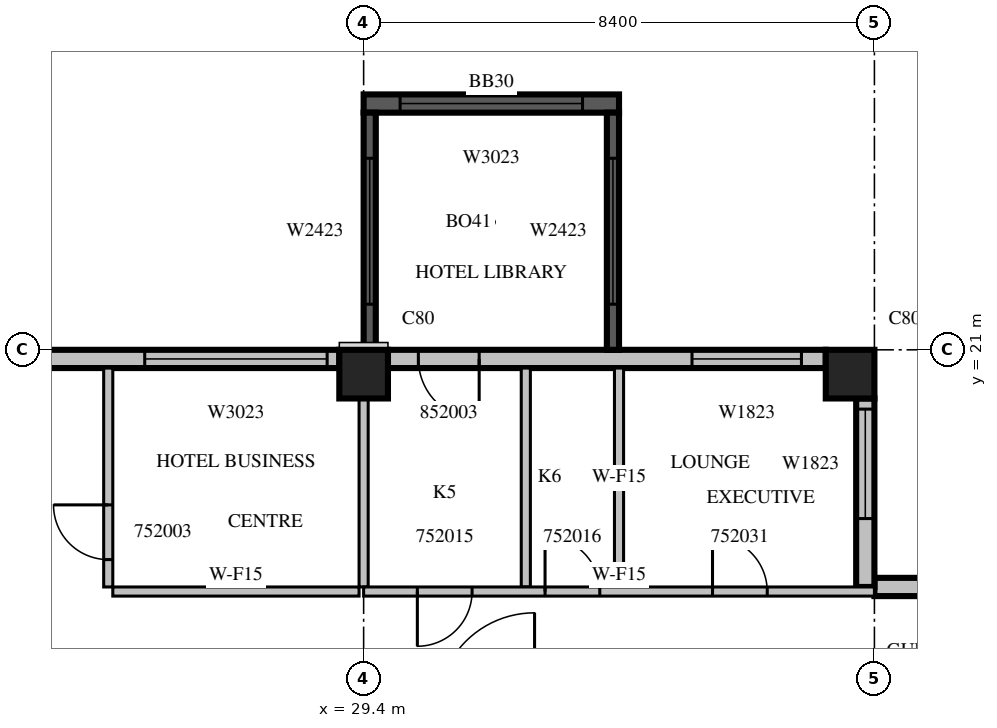
"""IFC4 building model, lengths in metres.
Left out: names, types, materials, properties, quantities, classifications, styles, units other than length and angle.
Written with IfcOpenShell. Run it as: python <this file> out.ifc"""

import sys

from ifc_helpers import new_model, si_unit, direction, frame, frame_2d, origin, origin_2d, place, context, subcontext, project, spatial, rectangle, extrude, source, transform, mapped, element, fill, save


model = new_model("IFC4")
c1 = context("Model", 3, precision=1e-05, world=origin(), true_north=direction((0.0, 1.0)))
c2 = subcontext(c1, "Body", "Model", "MODEL_VIEW")
j1 = project(units=[si_unit("LENGTHUNIT", "METRE"), si_unit("PLANEANGLEUNIT", "RADIAN")], contexts=[c1])
p1 = place(None, origin())
s1 = spatial("IfcSite", under=j1, at=p1, CompositionType="ELEMENT")
p2 = place(p1, origin())
s2 = spatial("IfcBuilding", under=s1, at=p2, CompositionType="ELEMENT")
p3 = place(p2, frame((0.0, 0.0, 231.0)))
s3 = spatial("IfcBuildingStorey", under=s2, at=p3, CompositionType="ELEMENT", Elevation=231.0)
m1 = source(origin(), c2, "Body", "SweptSolid", [
    extrude(rectangle(XDim=0.8, YDim=0.8, at=origin_2d()), origin(), (0.0, 0.0, 1.0), 3.8),
])
for number, where, z_axis, x_axis in (
    (1, (29.4, 20.6, 0.0), (0.0, 0.0, 1.0), (1.0, 0.0, 0.0)),
    (2, (37.4, 20.6, 0.0), (0.0, 0.0, 1.0), (1.0, 0.0, 0.0)),
):
    element("IfcColumn", number, at=place(p3, frame(where, z_axis=z_axis, x_axis=x_axis)), inside=s3, PredefinedType="COLUMN", context=c2, shape_type="MappedRepresentation", body=[
        mapped(m1, transform((0.0, 0.0, 0.0), scale=1.0)),
    ])
m2 = source(origin(), c2, "Body", "SweptSolid", [
    extrude(rectangle(XDim=15.96, YDim=0.3, at=frame_2d((7.98, 0.0))), origin(), (0.0, 0.0, 1.0), 3.4),
])
p4 = place(p3, frame((53.76, 17.1, 0.0), z_axis=(0.0, 0.0, 1.0), x_axis=(-1.0, 0.0, 0.0)))
e3 = element("IfcWall", 3, at=p4, inside=s3, PredefinedType="STANDARD", context=c2, shape_type="MappedRepresentation", body=[
    mapped(m2, transform((0.0, 0.0, 0.0), scale=1.0)),
])
m3 = source(origin(), c2, "Body", "SweptSolid", [
    extrude(rectangle(XDim=3.0, YDim=2.3, at=frame_2d((1.5, 1.15))), frame((0.0, 0.16, 0.0), z_axis=(0.0, -1.0, 0.0), x_axis=(1.0, 0.0, 0.0)), (0.0, 0.0, 1.0), 0.32),
])
p5 = place(p4, frame((0.6, 0.0, 0.6)))
e4 = element("IfcOpeningElement", 4, at=p5, cuts=e3, PredefinedType="OPENING", context=c2, shape_type="MappedRepresentation", body=[
    mapped(m3, transform((0.0, 0.0, 0.0), scale=1.0)),
])
p6 = place(p4, frame((4.8, 0.0, 0.6)))
e5 = element("IfcOpeningElement", 5, at=p6, cuts=e3, PredefinedType="OPENING", context=c2, shape_type="MappedRepresentation", body=[
    mapped(m3, transform((0.0, 0.0, 0.0), scale=1.0)),
])
m4 = source(origin(), c2, "Body", "SweptSolid", [
    extrude(rectangle(XDim=3.6, YDim=2.3, at=frame_2d((1.8, 1.15))), frame((0.0, 0.16, 0.0), z_axis=(0.0, -1.0, 0.0), x_axis=(1.0, 0.0, 0.0)), (0.0, 0.0, 1.0), 0.32),
])
p7 = place(p4, frame((9.54, 0.0, 0.6)))
e6 = element("IfcOpeningElement", 6, at=p7, cuts=e3, PredefinedType="OPENING", context=c2, shape_type="MappedRepresentation", body=[
    mapped(m4, transform((0.0, 0.0, 0.0), scale=1.0)),
])
m5 = source(origin(), c2, "Body", "SweptSolid", [
    extrude(rectangle(XDim=3.1, YDim=0.3, at=frame_2d((1.55, 0.0))), origin(), (0.0, 0.0, 1.0), 3.4),
])
p8 = place(p3, frame((37.65, 17.1, 0.0), z_axis=(0.0, 0.0, 1.0), x_axis=(0.0, 1.0, 0.0)))
e7 = element("IfcWall", 7, at=p8, inside=s3, PredefinedType="STANDARD", context=c2, shape_type="MappedRepresentation", body=[
    mapped(m5, transform((0.0, 0.0, 0.0), scale=1.0)),
])
m6 = source(origin(), c2, "Body", "SweptSolid", [
    extrude(rectangle(XDim=1.8, YDim=2.3, at=frame_2d((0.9, 1.15))), frame((0.0, 0.16, 0.0), z_axis=(0.0, -1.0, 0.0), x_axis=(1.0, 0.0, 0.0)), (0.0, 0.0, 1.0), 0.32),
])
p9 = place(p8, frame((1.125, 0.0, 0.6)))
e8 = element("IfcOpeningElement", 8, at=p9, cuts=e7, PredefinedType="OPENING", context=c2, shape_type="MappedRepresentation", body=[
    mapped(m6, transform((0.0, 0.0, 0.0), scale=1.0)),
])
m7 = source(origin(), c2, "Body", "SweptSolid", [
    extrude(rectangle(XDim=7.2, YDim=0.3, at=frame_2d((3.6, 0.0))), origin(), (0.0, 0.0, 1.0), 3.4),
])
p10 = place(p3, frame((37.0, 20.85, 0.0), z_axis=(0.0, 0.0, 1.0), x_axis=(-1.0, 0.0, 0.0)))
e9 = element("IfcWall", 9, at=p10, inside=s3, PredefinedType="STANDARD", context=c2, shape_type="MappedRepresentation", body=[
    mapped(m7, transform((0.0, 0.0, 0.0), scale=1.0)),
])
p11 = place(p10, frame((0.4, 0.0, 0.6)))
e10 = element("IfcOpeningElement", 10, at=p11, cuts=e9, PredefinedType="OPENING", context=c2, shape_type="MappedRepresentation", body=[
    mapped(m6, transform((0.0, 0.0, 0.0), scale=1.0)),
])
m8 = source(origin(), c2, "Body", "SweptSolid", [
    extrude(rectangle(XDim=1.0, YDim=2.1, at=frame_2d((0.5, 1.05))), frame((0.0, 0.16, 0.0), z_axis=(0.0, -1.0, 0.0), x_axis=(1.0, 0.0, 0.0)), (0.0, 0.0, 1.0), 0.32),
])
p12 = place(p10, frame((5.7, 0.0, 0.0)))
e11 = element("IfcOpeningElement", 11, at=p12, cuts=e9, PredefinedType="OPENING", context=c2, shape_type="MappedRepresentation", body=[
    mapped(m8, transform((0.0, 0.0, 0.0), scale=1.0)),
])
p13 = place(p3, frame((29.0, 20.85, 0.0), z_axis=(0.0, 0.0, 1.0), x_axis=(-1.0, 0.0, 0.0)))
e12 = element("IfcWall", 12, at=p13, inside=s3, PredefinedType="STANDARD", context=c2, shape_type="MappedRepresentation", body=[
    mapped(m7, transform((0.0, 0.0, 0.0), scale=1.0)),
])
p14 = place(p13, frame((0.2, 0.0, 0.6)))
e13 = element("IfcOpeningElement", 13, at=p14, cuts=e12, PredefinedType="OPENING", context=c2, shape_type="MappedRepresentation", body=[
    mapped(m3, transform((0.0, 0.0, 0.0), scale=1.0)),
])
p15 = place(p13, frame((5.0, 0.0, 0.6)))
e14 = element("IfcOpeningElement", 14, at=p15, cuts=e12, PredefinedType="OPENING", context=c2, shape_type="MappedRepresentation", body=[
    mapped(m6, transform((0.0, 0.0, 0.0), scale=1.0)),
])
m9 = source(origin(), c2, "Body", "SweptSolid", [
    extrude(rectangle(XDim=4.2, YDim=0.3, at=frame_2d((2.1, 0.0))), origin(), (0.0, 0.0, 1.0), 3.39),
])
p16 = place(p3, frame((33.6, 25.05, 0.0), z_axis=(0.0, 0.0, 1.0), x_axis=(-1.0, 0.0, 0.0)))
e15 = element("IfcWall", 15, at=p16, inside=s3, PredefinedType="SOLIDWALL", context=c2, shape_type="MappedRepresentation", body=[
    mapped(m9, transform((0.0, 0.0, 0.0), scale=1.0)),
])
p17 = place(p16, frame((0.6, 0.0, 0.6)))
e16 = element("IfcOpeningElement", 16, at=p17, cuts=e15, PredefinedType="OPENING", context=c2, shape_type="MappedRepresentation", body=[
    mapped(m3, transform((0.0, 0.0, 0.0), scale=1.0)),
])
m10 = source(origin(), c2, "Body", "SweptSolid", [
    extrude(rectangle(XDim=3.9, YDim=0.2, at=frame_2d((1.95, 0.0))), origin(), (0.0, 0.0, 1.0), 3.39),
])
p18 = place(p3, frame((33.5, 21.0, 0.0), z_axis=(0.0, 0.0, 1.0), x_axis=(0.0, 1.0, 0.0)))
e17 = element("IfcWall", 17, at=p18, inside=s3, PredefinedType="SOLIDWALL", context=c2, shape_type="MappedRepresentation", body=[
    mapped(m10, transform((0.0, 0.0, 0.0), scale=1.0)),
])
m11 = source(origin(), c2, "Body", "SweptSolid", [
    extrude(rectangle(XDim=2.4, YDim=2.3, at=frame_2d((1.2, 1.15))), frame((0.0, 0.11, 0.0), z_axis=(0.0, -1.0, 0.0), x_axis=(1.0, 0.0, 0.0)), (0.0, 0.0, 1.0), 0.22),
])
p19 = place(p18, frame((0.75, 0.0, 0.6)))
e18 = element("IfcOpeningElement", 18, at=p19, cuts=e17, PredefinedType="OPENING", context=c2, shape_type="MappedRepresentation", body=[
    mapped(m11, transform((0.0, 0.0, 0.0), scale=1.0)),
])
p20 = place(p3, frame((29.5, 21.0, 0.0), z_axis=(0.0, 0.0, 1.0), x_axis=(0.0, 1.0, 0.0)))
e19 = element("IfcWall", 19, at=p20, inside=s3, PredefinedType="SOLIDWALL", context=c2, shape_type="MappedRepresentation", body=[
    mapped(m10, transform((0.0, 0.0, 0.0), scale=1.0)),
])
p21 = place(p20, frame((0.75, 0.0, 0.6)))
e20 = element("IfcOpeningElement", 20, at=p21, cuts=e19, PredefinedType="OPENING", context=c2, shape_type="MappedRepresentation", body=[
    mapped(m11, transform((0.0, 0.0, 0.0), scale=1.0)),
])
m12 = source(origin(), c2, "Body", "SweptSolid", [
    extrude(rectangle(XDim=3.6, YDim=0.15, at=frame_2d((1.8, 0.0))), origin(), (0.0, 0.0, 1.0), 3.4),
])
p22 = place(p3, frame((25.2, 20.7, 0.0), z_axis=(0.0, 0.0, 1.0), x_axis=(0.0, -1.0, 0.0)))
e21 = element("IfcWall", 21, at=p22, inside=s3, PredefinedType="PARTITIONING", context=c2, shape_type="MappedRepresentation", body=[
    mapped(m12, transform((0.0, 0.0, 0.0), scale=1.0)),
])
m13 = source(origin(), c2, "Body", "SweptSolid", [
    extrude(rectangle(XDim=0.9, YDim=2.1, at=frame_2d((0.45, 1.05))), frame((0.0, 0.085, 0.0), z_axis=(0.0, -1.0, 0.0), x_axis=(1.0, 0.0, 0.0)), (0.0, 0.0, 1.0), 0.17),
])
p23 = place(p22, frame((2.25, 0.0, 0.0)))
e22 = element("IfcOpeningElement", 22, at=p23, cuts=e21, PredefinedType="OPENING", context=c2, shape_type="MappedRepresentation", body=[
    mapped(m13, transform((0.0, 0.0, 0.0), scale=1.0)),
])
m14 = source(origin(), c2, "Body", "SweptSolid", [
    extrude(rectangle(XDim=4.05, YDim=0.15, at=frame_2d((2.025, 0.0))), origin(), (0.0, 0.0, 1.0), 3.4),
])
p24 = place(p3, frame((25.275, 17.025, 0.0), z_axis=(0.0, 0.0, 1.0), x_axis=(1.0, 0.0, 0.0)))
e23 = element("IfcWall", 23, at=p24, inside=s3, PredefinedType="PARTITIONING", context=c2, shape_type="MappedRepresentation", body=[
    mapped(m14, transform((0.0, 0.0, 0.0), scale=1.0)),
])
m15 = source(origin(), c2, "Body", "SweptSolid", [
    extrude(rectangle(XDim=3.101, YDim=0.15, at=frame_2d((1.55, 0.0))), origin(), (0.0, 0.0, 1.0), 3.4),
])
p25 = place(p3, frame((29.4, 17.1, 0.0), z_axis=(0.0, 0.0, 1.0), x_axis=(0.0, 1.0, 0.0)))
e24 = element("IfcWall", 24, at=p25, inside=s3, PredefinedType="PARTITIONING", context=c2, shape_type="MappedRepresentation", body=[
    mapped(m15, transform((0.0, 0.0, 0.0), scale=1.0)),
])
for number, where, z_axis, x_axis in (
    (25, (32.067, 20.7, 0.0), (0.0, 0.0, 1.0), (0.0, -1.0, 0.0)),
    (26, (33.6, 17.1, 0.0), (0.0, 0.0, 1.0), (0.0, 1.0, 0.0)),
):
    element("IfcWall", number, at=place(p3, frame(where, z_axis=z_axis, x_axis=x_axis)), inside=s3, PredefinedType="PARTITIONING", context=c2, shape_type="MappedRepresentation", body=[
        mapped(m12, transform((0.0, 0.0, 0.0), scale=1.0)),
    ])
m16 = source(origin(), c2, "Body", "SweptSolid", [
    extrude(rectangle(XDim=8.4, YDim=0.15, at=frame_2d((4.2, 0.0))), origin(), (0.0, 0.0, 1.0), 3.4),
])
p26 = place(p3, frame((29.4, 17.025, 0.0), z_axis=(0.0, 0.0, 1.0), x_axis=(1.0, 0.0, 0.0)))
e27 = element("IfcWall", 27, at=p26, inside=s3, PredefinedType="PARTITIONING", context=c2, shape_type="MappedRepresentation", body=[
    mapped(m16, transform((0.0, 0.0, 0.0), scale=1.0)),
])
p27 = place(p26, frame((0.883, 0.0, 0.0)))
e28 = element("IfcOpeningElement", 28, at=p27, cuts=e27, PredefinedType="OPENING", context=c2, shape_type="MappedRepresentation", body=[
    mapped(m13, transform((0.0, 0.0, 0.0), scale=1.0)),
])
p28 = place(p26, frame((2.983, 0.0, 0.0)))
e29 = element("IfcOpeningElement", 29, at=p28, cuts=e27, PredefinedType="OPENING", context=c2, shape_type="MappedRepresentation", body=[
    mapped(m13, transform((0.0, 0.0, 0.0), scale=1.0)),
])
p29 = place(p26, frame((5.737, 0.0, 0.0)))
e30 = element("IfcOpeningElement", 30, at=p29, cuts=e27, PredefinedType="OPENING", context=c2, shape_type="MappedRepresentation", body=[
    mapped(m13, transform((0.0, 0.0, 0.0), scale=1.0)),
])
m17 = source(origin(), c2, "Body", "SweptSolid", [
    extrude(rectangle(XDim=1.8, YDim=2.3, at=frame_2d((0.9, 1.15))), frame((0.0, 0.03, 0.0), z_axis=(0.0, -1.0, 0.0), x_axis=(1.0, 0.0, 0.0)), (0.0, 0.0, 1.0), 0.06),
])
p30 = place(p9, origin())
e31 = element("IfcWindow", 31, at=p30, inside=s3, PartitioningType="SINGLE_PANEL", PredefinedType="WINDOW", context=c2, shape_type="MappedRepresentation", body=[
    mapped(m17, transform((0.0, 0.0, 0.0), scale=1.0)),
])
fill(e8, e31)
p31 = place(p11, origin())
e32 = element("IfcWindow", 32, at=p31, inside=s3, PartitioningType="SINGLE_PANEL", PredefinedType="WINDOW", context=c2, shape_type="MappedRepresentation", body=[
    mapped(m17, transform((0.0, 0.0, 0.0), scale=1.0)),
])
fill(e10, e32)
m18 = source(origin(), c2, "Body", "SweptSolid", [
    extrude(rectangle(XDim=3.0, YDim=2.3, at=frame_2d((1.5, 1.15))), frame((0.0, 0.03, 0.0), z_axis=(0.0, -1.0, 0.0), x_axis=(1.0, 0.0, 0.0)), (0.0, 0.0, 1.0), 0.06),
])
p32 = place(p14, origin())
e33 = element("IfcWindow", 33, at=p32, inside=s3, PartitioningType="SINGLE_PANEL", PredefinedType="WINDOW", context=c2, shape_type="MappedRepresentation", body=[
    mapped(m18, transform((0.0, 0.0, 0.0), scale=1.0)),
])
fill(e13, e33)
p33 = place(p17, origin())
e34 = element("IfcWindow", 34, at=p33, inside=s3, PartitioningType="SINGLE_PANEL", PredefinedType="WINDOW", context=c2, shape_type="MappedRepresentation", body=[
    mapped(m18, transform((0.0, 0.0, 0.0), scale=1.0)),
])
fill(e16, e34)
m19 = source(origin(), c2, "Body", "SweptSolid", [
    extrude(rectangle(XDim=2.4, YDim=2.3, at=frame_2d((1.2, 1.15))), frame((0.0, 0.03, 0.0), z_axis=(0.0, -1.0, 0.0), x_axis=(1.0, 0.0, 0.0)), (0.0, 0.0, 1.0), 0.06),
])
p34 = place(p19, origin())
e35 = element("IfcWindow", 35, at=p34, inside=s3, PartitioningType="SINGLE_PANEL", PredefinedType="WINDOW", context=c2, shape_type="MappedRepresentation", body=[
    mapped(m19, transform((0.0, 0.0, 0.0), scale=1.0)),
])
fill(e18, e35)
p35 = place(p21, origin())
e36 = element("IfcWindow", 36, at=p35, inside=s3, PartitioningType="SINGLE_PANEL", PredefinedType="WINDOW", context=c2, shape_type="MappedRepresentation", body=[
    mapped(m19, transform((0.0, 0.0, 0.0), scale=1.0)),
])
fill(e20, e36)
m20 = source(origin(), c2, "Body", "SweptSolid", [
    extrude(rectangle(XDim=0.9, YDim=2.1, at=frame_2d((0.45, 1.05))), frame((0.0, 0.025, 0.0), z_axis=(0.0, -1.0, 0.0), x_axis=(1.0, 0.0, 0.0)), (0.0, 0.0, 1.0), 0.05),
])
p36 = place(p23, origin())
e37 = element("IfcDoor", 37, at=p36, inside=s3, OperationType="SINGLE_SWING_RIGHT", PredefinedType="DOOR", context=c2, shape_type="MappedRepresentation", body=[
    mapped(m20, transform((0.0, 0.0, 0.0), scale=1.0)),
])
fill(e22, e37)
p37 = place(p27, origin())
e38 = element("IfcDoor", 38, at=p37, inside=s3, OperationType="SINGLE_SWING_RIGHT", PredefinedType="DOOR", context=c2, shape_type="MappedRepresentation", body=[
    mapped(m20, transform((0.0, 0.0, 0.0), scale=1.0)),
])
fill(e28, e38)
p38 = place(p28, origin())
e39 = element("IfcDoor", 39, at=p38, inside=s3, OperationType="SINGLE_SWING_LEFT", PredefinedType="DOOR", context=c2, shape_type="MappedRepresentation", body=[
    mapped(m20, transform((0.0, 0.0, 0.0), scale=1.0)),
])
fill(e29, e39)
p39 = place(p29, origin())
e40 = element("IfcDoor", 40, at=p39, inside=s3, OperationType="SINGLE_SWING_LEFT", PredefinedType="DOOR", context=c2, shape_type="MappedRepresentation", body=[
    mapped(m20, transform((0.0, 0.0, 0.0), scale=1.0)),
])
fill(e30, e40)
m21 = source(origin(), c2, "Body", "SweptSolid", [
    extrude(rectangle(XDim=1.0, YDim=2.1, at=frame_2d((0.5, 1.05))), frame((0.0, 0.025, 0.0), z_axis=(0.0, -1.0, 0.0), x_axis=(1.0, 0.0, 0.0)), (0.0, 0.0, 1.0), 0.05),
])
p40 = place(p12, origin())
e41 = element("IfcDoor", 41, at=p40, inside=s3, OperationType="SINGLE_SWING_LEFT", PredefinedType="DOOR", context=c2, shape_type="MappedRepresentation", body=[
    mapped(m21, transform((0.0, 0.0, 0.0), scale=1.0)),
])
fill(e11, e41)
save(model, sys.argv[1])
